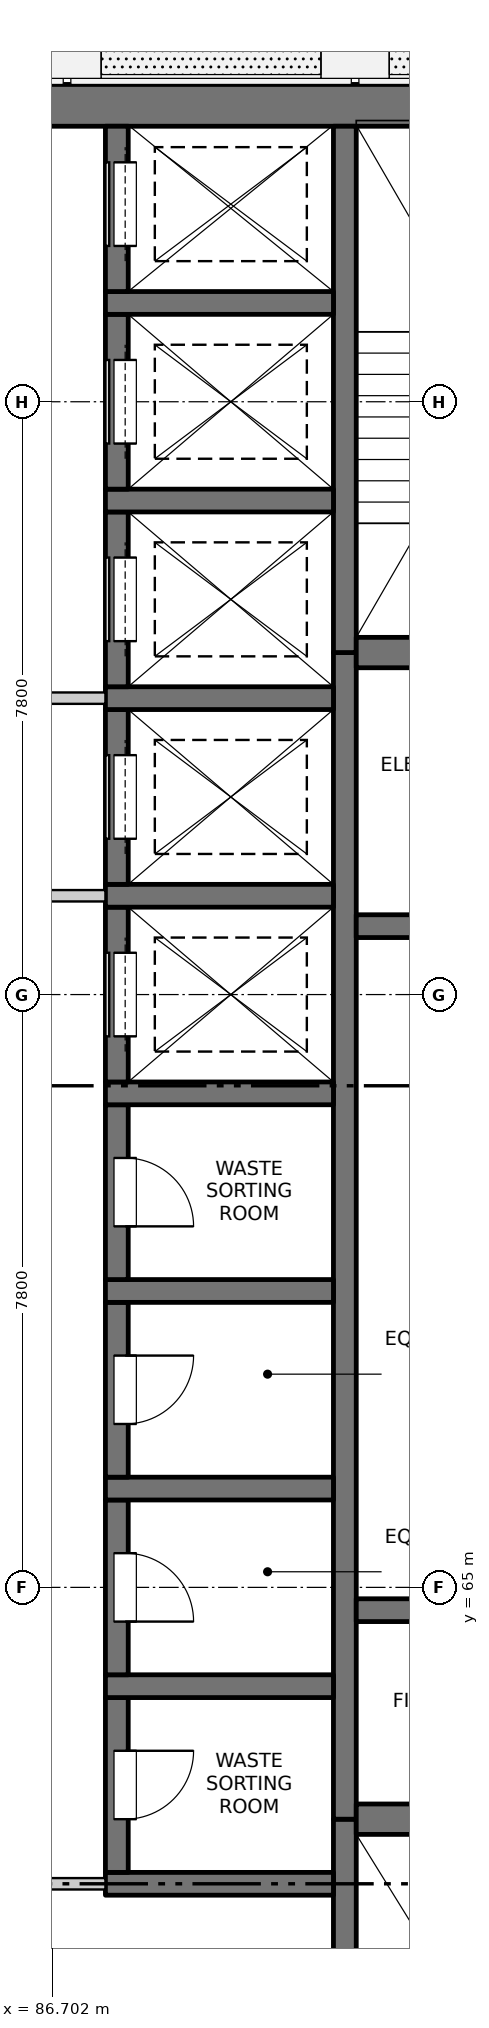
"""IFC4 building model, lengths in metres.
Left out: names, types, materials, properties, quantities, classifications, styles, units other than length and angle.
Written with IfcOpenShell. Run it as: python <this file> out.ifc"""

import sys

from ifc_helpers import new_model, si_unit, direction, frame, frame_2d, origin, place, context, subcontext, project, spatial, rectangle, extrude, element, fill, save


model = new_model("IFC4")
c1 = context("Model", 3, precision=1e-05, world=origin(), true_north=direction((0.0, 1.0)))
c2 = subcontext(c1, "Body", "Model", "MODEL_VIEW")
j1 = project(units=[si_unit("LENGTHUNIT", "METRE"), si_unit("PLANEANGLEUNIT", "RADIAN")], contexts=[c1])
p1 = place(None, origin())
s1 = spatial("IfcSite", under=j1, at=p1, CompositionType="ELEMENT")
p2 = place(p1, origin())
s2 = spatial("IfcBuilding", under=s1, at=p2, CompositionType="ELEMENT")
p3 = place(p2, frame((0.0, 0.0, 179.2)))
s3 = spatial("IfcBuildingStorey", under=s2, at=p3, CompositionType="ELEMENT", Elevation=179.2)
p4 = place(p3, frame((75.525, 84.5, -0.3), z_axis=(0.0, 0.0, 1.0), x_axis=(1.0, 0.0, 0.0)))
e1 = element("IfcWall", 1, at=p4, inside=s3, PredefinedType="SOLIDWALL", context=c2, shape_type="SweptSolid", body=[
    extrude(rectangle(XDim=18.95, YDim=0.55, at=frame_2d((9.475, 0.0))), origin(), (0.0, 0.0, 1.0), 3.45),
])
p5 = place(p3, frame((90.55, 55.525, -0.3), z_axis=(0.0, 0.0, 1.0), x_axis=(0.0, 1.0, 0.0)))
e2 = element("IfcWall", 2, at=p5, inside=s3, PredefinedType="SOLIDWALL", context=c2, shape_type="SweptSolid", body=[
    extrude(rectangle(XDim=6.425, YDim=0.3, at=frame_2d((3.212, 0.0))), origin(), (0.0, 0.0, 1.0), 3.45),
])
p6 = place(p5, frame((0.125, 0.0, 0.3)))
e3 = element("IfcOpeningElement", 3, at=p6, cuts=e2, PredefinedType="OPENING", context=c2, shape_type="SweptSolid", body=[
    extrude(rectangle(XDim=1.2, YDim=2.1, at=frame_2d((0.6, 1.05))), frame((0.0, 0.16, 0.0), z_axis=(0.0, -1.0, 0.0), x_axis=(1.0, 0.0, 0.0)), (0.0, 0.0, 1.0), 0.32),
])
p7 = place(p3, frame((90.55, 61.95, -0.3), z_axis=(0.0, 0.0, 1.0), x_axis=(0.0, 1.0, 0.0)))
e4 = element("IfcWall", 4, at=p7, inside=s3, PredefinedType="SOLIDWALL", context=c2, shape_type="SweptSolid", body=[
    extrude(rectangle(XDim=15.35, YDim=0.3, at=frame_2d((7.675, 0.0))), origin(), (0.0, 0.0, 1.0), 3.45),
])
p8 = place(p3, frame((90.55, 77.3, -0.3), z_axis=(0.0, 0.0, 1.0), x_axis=(0.0, 1.0, 0.0)))
e5 = element("IfcWall", 5, at=p8, inside=s3, PredefinedType="SOLIDWALL", context=c2, shape_type="SweptSolid", body=[
    extrude(rectangle(XDim=6.925, YDim=0.3, at=frame_2d((3.462, 0.0))), origin(), (0.0, 0.0, 1.0), 3.45),
])
p9 = place(p3, frame((87.4, 61.1, -0.3), z_axis=(0.0, 0.0, 1.0), x_axis=(1.0, 0.0, 0.0)))
e6 = element("IfcWall", 6, at=p9, inside=s3, PredefinedType="SOLIDWALL", context=c2, shape_type="SweptSolid", body=[
    extrude(rectangle(XDim=3.0, YDim=0.3, at=frame_2d((1.5, 0.0))), origin(), (0.0, 0.0, 1.0), 3.45),
])
p10 = place(p3, frame((87.55, 61.25, -0.3), z_axis=(0.0, 0.0, 1.0), x_axis=(0.0, 1.0, 0.0)))
e7 = element("IfcWall", 7, at=p10, inside=s3, PredefinedType="SOLIDWALL", context=c2, shape_type="SweptSolid", body=[
    extrude(rectangle(XDim=2.3, YDim=0.3, at=frame_2d((1.15, 0.0))), origin(), (0.0, 0.0, 1.0), 3.45),
])
p11 = place(p10, frame((0.7, 0.0, 0.3)))
e8 = element("IfcOpeningElement", 8, at=p11, cuts=e7, PredefinedType="OPENING", context=c2, shape_type="SweptSolid", body=[
    extrude(rectangle(XDim=0.9, YDim=2.1, at=frame_2d((0.45, 1.05))), frame((0.0, 0.16, 0.0), z_axis=(0.0, -1.0, 0.0), x_axis=(1.0, 0.0, 0.0)), (0.0, 0.0, 1.0), 0.32),
])
p12 = place(p3, frame((87.4, 63.7, -0.3), z_axis=(0.0, 0.0, 1.0), x_axis=(1.0, 0.0, 0.0)))
e9 = element("IfcWall", 9, at=p12, inside=s3, PredefinedType="SOLIDWALL", context=c2, shape_type="SweptSolid", body=[
    extrude(rectangle(XDim=3.0, YDim=0.3, at=frame_2d((1.5, 0.0))), origin(), (0.0, 0.0, 1.0), 3.45),
])
p13 = place(p3, frame((87.55, 63.85, -0.3), z_axis=(0.0, 0.0, 1.0), x_axis=(0.0, 1.0, 0.0)))
e10 = element("IfcWall", 10, at=p13, inside=s3, PredefinedType="SOLIDWALL", context=c2, shape_type="SweptSolid", body=[
    extrude(rectangle(XDim=2.3, YDim=0.3, at=frame_2d((1.15, 0.0))), origin(), (0.0, 0.0, 1.0), 3.45),
])
p14 = place(p13, frame((0.7, 0.0, 0.3)))
e11 = element("IfcOpeningElement", 11, at=p14, cuts=e10, PredefinedType="OPENING", context=c2, shape_type="SweptSolid", body=[
    extrude(rectangle(XDim=0.9, YDim=2.1, at=frame_2d((0.45, 1.05))), frame((0.0, 0.16, 0.0), z_axis=(0.0, -1.0, 0.0), x_axis=(1.0, 0.0, 0.0)), (0.0, 0.0, 1.0), 0.32),
])
p15 = place(p3, frame((87.4, 66.3, -0.3), z_axis=(0.0, 0.0, 1.0), x_axis=(1.0, 0.0, 0.0)))
e12 = element("IfcWall", 12, at=p15, inside=s3, PredefinedType="SOLIDWALL", context=c2, shape_type="SweptSolid", body=[
    extrude(rectangle(XDim=3.0, YDim=0.3, at=frame_2d((1.5, 0.0))), origin(), (0.0, 0.0, 1.0), 3.45),
])
p16 = place(p3, frame((87.55, 66.45, -0.3), z_axis=(0.0, 0.0, 1.0), x_axis=(0.0, 1.0, 0.0)))
e13 = element("IfcWall", 13, at=p16, inside=s3, PredefinedType="SOLIDWALL", context=c2, shape_type="SweptSolid", body=[
    extrude(rectangle(XDim=2.3, YDim=0.3, at=frame_2d((1.15, 0.0))), origin(), (0.0, 0.0, 1.0), 3.45),
])
p17 = place(p16, frame((0.7, 0.0, 0.3)))
e14 = element("IfcOpeningElement", 14, at=p17, cuts=e13, PredefinedType="OPENING", context=c2, shape_type="SweptSolid", body=[
    extrude(rectangle(XDim=0.9, YDim=2.1, at=frame_2d((0.45, 1.05))), frame((0.0, 0.16, 0.0), z_axis=(0.0, -1.0, 0.0), x_axis=(1.0, 0.0, 0.0)), (0.0, 0.0, 1.0), 0.32),
])
p18 = place(p3, frame((87.4, 68.9, -0.3), z_axis=(0.0, 0.0, 1.0), x_axis=(1.0, 0.0, 0.0)))
e15 = element("IfcWall", 15, at=p18, inside=s3, PredefinedType="SOLIDWALL", context=c2, shape_type="SweptSolid", body=[
    extrude(rectangle(XDim=3.0, YDim=0.3, at=frame_2d((1.5, 0.0))), origin(), (0.0, 0.0, 1.0), 3.45),
])
p19 = place(p3, frame((87.55, 69.05, -0.3), z_axis=(0.0, 0.0, 1.0), x_axis=(0.0, 1.0, 0.0)))
e16 = element("IfcWall", 16, at=p19, inside=s3, PredefinedType="SOLIDWALL", context=c2, shape_type="SweptSolid", body=[
    extrude(rectangle(XDim=2.3, YDim=0.3, at=frame_2d((1.15, 0.0))), origin(), (0.0, 0.0, 1.0), 3.45),
])
p20 = place(p19, frame((0.7, 0.0, 0.3)))
e17 = element("IfcOpeningElement", 17, at=p20, cuts=e16, PredefinedType="OPENING", context=c2, shape_type="SweptSolid", body=[
    extrude(rectangle(XDim=0.9, YDim=2.1, at=frame_2d((0.45, 1.05))), frame((0.0, 0.16, 0.0), z_axis=(0.0, -1.0, 0.0), x_axis=(1.0, 0.0, 0.0)), (0.0, 0.0, 1.0), 0.32),
])
p21 = place(p3, frame((87.4, 71.5, -0.3), z_axis=(0.0, 0.0, 1.0), x_axis=(1.0, 0.0, 0.0)))
e18 = element("IfcWall", 18, at=p21, inside=s3, PredefinedType="SOLIDWALL", context=c2, shape_type="SweptSolid", body=[
    extrude(rectangle(XDim=3.0, YDim=0.3, at=frame_2d((1.5, 0.0))), origin(), (0.0, 0.0, 1.0), 3.45),
])
p22 = place(p3, frame((87.55, 71.65, -0.3), z_axis=(0.0, 0.0, 1.0), x_axis=(0.0, 1.0, 0.0)))
e19 = element("IfcWall", 19, at=p22, inside=s3, PredefinedType="SOLIDWALL", context=c2, shape_type="SweptSolid", body=[
    extrude(rectangle(XDim=2.3, YDim=0.3, at=frame_2d((1.15, 0.0))), origin(), (0.0, 0.0, 1.0), 3.45),
])
p23 = place(p22, frame((0.6, 0.0, 0.3)))
e20 = element("IfcOpeningElement", 20, at=p23, cuts=e19, PredefinedType="OPENING", context=c2, shape_type="SweptSolid", body=[
    extrude(rectangle(XDim=1.1, YDim=2.1, at=frame_2d((0.55, 1.05))), frame((0.0, 0.16, 0.0), z_axis=(0.0, -1.0, 0.0), x_axis=(1.0, 0.0, 0.0)), (0.0, 0.0, 1.0), 0.32),
])
p24 = place(p3, frame((87.4, 74.1, -0.3), z_axis=(0.0, 0.0, 1.0), x_axis=(1.0, 0.0, 0.0)))
e21 = element("IfcWall", 21, at=p24, inside=s3, PredefinedType="SOLIDWALL", context=c2, shape_type="SweptSolid", body=[
    extrude(rectangle(XDim=3.0, YDim=0.3, at=frame_2d((1.5, 0.0))), origin(), (0.0, 0.0, 1.0), 3.45),
])
p25 = place(p3, frame((87.55, 74.25, -0.3), z_axis=(0.0, 0.0, 1.0), x_axis=(0.0, 1.0, 0.0)))
e22 = element("IfcWall", 22, at=p25, inside=s3, PredefinedType="SOLIDWALL", context=c2, shape_type="SweptSolid", body=[
    extrude(rectangle(XDim=2.3, YDim=0.3, at=frame_2d((1.15, 0.0))), origin(), (0.0, 0.0, 1.0), 3.45),
])
p26 = place(p25, frame((0.6, 0.0, 0.3)))
e23 = element("IfcOpeningElement", 23, at=p26, cuts=e22, PredefinedType="OPENING", context=c2, shape_type="SweptSolid", body=[
    extrude(rectangle(XDim=1.1, YDim=2.1, at=frame_2d((0.55, 1.05))), frame((0.0, 0.16, 0.0), z_axis=(0.0, -1.0, 0.0), x_axis=(1.0, 0.0, 0.0)), (0.0, 0.0, 1.0), 0.32),
])
p27 = place(p3, frame((87.4, 76.7, -0.3), z_axis=(0.0, 0.0, 1.0), x_axis=(1.0, 0.0, 0.0)))
e24 = element("IfcWall", 24, at=p27, inside=s3, PredefinedType="SOLIDWALL", context=c2, shape_type="SweptSolid", body=[
    extrude(rectangle(XDim=3.0, YDim=0.3, at=frame_2d((1.5, 0.0))), origin(), (0.0, 0.0, 1.0), 3.45),
])
p28 = place(p3, frame((87.55, 76.85, -0.3), z_axis=(0.0, 0.0, 1.0), x_axis=(0.0, 1.0, 0.0)))
e25 = element("IfcWall", 25, at=p28, inside=s3, PredefinedType="SOLIDWALL", context=c2, shape_type="SweptSolid", body=[
    extrude(rectangle(XDim=2.3, YDim=0.3, at=frame_2d((1.15, 0.0))), origin(), (0.0, 0.0, 1.0), 3.45),
])
p29 = place(p28, frame((0.6, 0.0, 0.3)))
e26 = element("IfcOpeningElement", 26, at=p29, cuts=e25, PredefinedType="OPENING", context=c2, shape_type="SweptSolid", body=[
    extrude(rectangle(XDim=1.1, YDim=2.1, at=frame_2d((0.55, 1.05))), frame((0.0, 0.16, 0.0), z_axis=(0.0, -1.0, 0.0), x_axis=(1.0, 0.0, 0.0)), (0.0, 0.0, 1.0), 0.32),
])
p30 = place(p3, frame((87.4, 79.3, -0.3), z_axis=(0.0, 0.0, 1.0), x_axis=(1.0, 0.0, 0.0)))
e27 = element("IfcWall", 27, at=p30, inside=s3, PredefinedType="SOLIDWALL", context=c2, shape_type="SweptSolid", body=[
    extrude(rectangle(XDim=3.0, YDim=0.3, at=frame_2d((1.5, 0.0))), origin(), (0.0, 0.0, 1.0), 3.45),
])
p31 = place(p3, frame((87.55, 79.45, -0.3), z_axis=(0.0, 0.0, 1.0), x_axis=(0.0, 1.0, 0.0)))
e28 = element("IfcWall", 28, at=p31, inside=s3, PredefinedType="SOLIDWALL", context=c2, shape_type="SweptSolid", body=[
    extrude(rectangle(XDim=2.3, YDim=0.3, at=frame_2d((1.15, 0.0))), origin(), (0.0, 0.0, 1.0), 3.45),
])
p32 = place(p31, frame((0.6, 0.0, 0.3)))
e29 = element("IfcOpeningElement", 29, at=p32, cuts=e28, PredefinedType="OPENING", context=c2, shape_type="SweptSolid", body=[
    extrude(rectangle(XDim=1.1, YDim=2.1, at=frame_2d((0.55, 1.05))), frame((0.0, 0.16, 0.0), z_axis=(0.0, -1.0, 0.0), x_axis=(1.0, 0.0, 0.0)), (0.0, 0.0, 1.0), 0.32),
])
p33 = place(p3, frame((87.4, 81.9, -0.3), z_axis=(0.0, 0.0, 1.0), x_axis=(1.0, 0.0, 0.0)))
e30 = element("IfcWall", 30, at=p33, inside=s3, PredefinedType="SOLIDWALL", context=c2, shape_type="SweptSolid", body=[
    extrude(rectangle(XDim=3.0, YDim=0.3, at=frame_2d((1.5, 0.0))), origin(), (0.0, 0.0, 1.0), 3.45),
])
p34 = place(p3, frame((87.55, 82.05, -0.3), z_axis=(0.0, 0.0, 1.0), x_axis=(0.0, 1.0, 0.0)))
e31 = element("IfcWall", 31, at=p34, inside=s3, PredefinedType="SOLIDWALL", context=c2, shape_type="SweptSolid", body=[
    extrude(rectangle(XDim=2.175, YDim=0.3, at=frame_2d((1.087, 0.0))), origin(), (0.0, 0.0, 1.0), 3.45),
])
p35 = place(p34, frame((0.6, 0.0, 0.3)))
e32 = element("IfcOpeningElement", 32, at=p35, cuts=e31, PredefinedType="OPENING", context=c2, shape_type="SweptSolid", body=[
    extrude(rectangle(XDim=1.1, YDim=2.1, at=frame_2d((0.55, 1.05))), frame((0.0, 0.16, 0.0), z_axis=(0.0, -1.0, 0.0), x_axis=(1.0, 0.0, 0.0)), (0.0, 0.0, 1.0), 0.32),
])
p36 = place(p3, frame((90.7, 61.95, -0.3), z_axis=(0.0, 0.0, 1.0), x_axis=(1.0, 0.0, 0.0)))
e33 = element("IfcWall", 33, at=p36, inside=s3, PredefinedType="SOLIDWALL", context=c2, shape_type="SweptSolid", body=[
    extrude(rectangle(XDim=3.775, YDim=0.4, at=frame_2d((1.888, 0.0))), origin(), (0.0, 0.0, 1.0), 3.45),
])
for number, where, z_axis, x_axis in (
    (34, (90.7, 64.7, -0.3), (0.0, 0.0, 1.0), (1.0, 0.0, 0.0)),
    (35, (90.7, 73.7, -0.3), (0.0, 0.0, 1.0), (1.0, 0.0, 0.0)),
):
    element("IfcWall", number, at=place(p3, frame(where, z_axis=z_axis, x_axis=x_axis)), inside=s3, PredefinedType="SOLIDWALL", context=c2, shape_type="SweptSolid", body=[
        extrude(rectangle(XDim=3.775, YDim=0.3, at=frame_2d((1.888, 0.0))), origin(), (0.0, 0.0, 1.0), 3.45),
    ])
p37 = place(p3, frame((90.7, 77.3, -0.3), z_axis=(0.0, 0.0, 1.0), x_axis=(1.0, 0.0, 0.0)))
e36 = element("IfcWall", 36, at=p37, inside=s3, PredefinedType="SOLIDWALL", context=c2, shape_type="SweptSolid", body=[
    extrude(rectangle(XDim=3.775, YDim=0.4, at=frame_2d((1.888, 0.0))), origin(), (0.0, 0.0, 1.0), 3.45),
])
p38 = place(p3, frame((82.6, 61.1, 0.0), z_axis=(0.0, 0.0, 1.0), x_axis=(1.0, 0.0, 0.0)))
e37 = element("IfcWall", 37, at=p38, inside=s3, PredefinedType="PARTITIONING", context=c2, shape_type="SweptSolid", body=[
    extrude(rectangle(XDim=4.8, YDim=0.15, at=frame_2d((2.4, 0.0))), origin(), (0.0, 0.0, 1.0), 3.15),
])
p39 = place(p38, frame((1.5, 0.0, 0.0)))
e38 = element("IfcOpeningElement", 38, at=p39, cuts=e37, PredefinedType="OPENING", context=c2, shape_type="SweptSolid", body=[
    extrude(rectangle(XDim=1.8, YDim=2.1, at=frame_2d((0.9, 1.05))), frame((0.0, 0.085, 0.0), z_axis=(0.0, -1.0, 0.0), x_axis=(1.0, 0.0, 0.0)), (0.0, 0.0, 1.0), 0.17),
])
p40 = place(p3, frame((82.6, 74.1, 0.0), z_axis=(0.0, 0.0, 1.0), x_axis=(1.0, 0.0, 0.0)))
e39 = element("IfcWall", 39, at=p40, inside=s3, PredefinedType="PARTITIONING", context=c2, shape_type="SweptSolid", body=[
    extrude(rectangle(XDim=4.8, YDim=0.15, at=frame_2d((2.4, 0.0))), origin(), (0.0, 0.0, 1.0), 3.15),
])
p41 = place(p40, frame((1.5, 0.0, 0.0)))
e40 = element("IfcOpeningElement", 40, at=p41, cuts=e39, PredefinedType="OPENING", context=c2, shape_type="SweptSolid", body=[
    extrude(rectangle(XDim=1.8, YDim=2.1, at=frame_2d((0.9, 1.05))), frame((0.0, 0.085, 0.0), z_axis=(0.0, -1.0, 0.0), x_axis=(1.0, 0.0, 0.0)), (0.0, 0.0, 1.0), 0.17),
])
p42 = place(p3, frame((82.6, 76.7, 0.0), z_axis=(0.0, 0.0, 1.0), x_axis=(1.0, 0.0, 0.0)))
e41 = element("IfcWall", 41, at=p42, inside=s3, PredefinedType="PARTITIONING", context=c2, shape_type="SweptSolid", body=[
    extrude(rectangle(XDim=4.8, YDim=0.15, at=frame_2d((2.4, 0.0))), origin(), (0.0, 0.0, 1.0), 3.15),
])
p43 = place(p42, frame((1.5, 0.0, 0.0)))
e42 = element("IfcOpeningElement", 42, at=p43, cuts=e41, PredefinedType="OPENING", context=c2, shape_type="SweptSolid", body=[
    extrude(rectangle(XDim=1.8, YDim=2.1, at=frame_2d((0.9, 1.05))), frame((0.0, 0.085, 0.0), z_axis=(0.0, -1.0, 0.0), x_axis=(1.0, 0.0, 0.0)), (0.0, 0.0, 1.0), 0.17),
])
p44 = place(p11, origin())
e43 = element("IfcDoor", 43, at=p44, inside=s3, OperationType="SINGLE_SWING_LEFT", PredefinedType="DOOR", context=c2, shape_type="SweptSolid", body=[
    extrude(rectangle(XDim=0.9, YDim=2.1, at=frame_2d((0.45, 1.05))), frame((0.0, -0.085, 0.0), z_axis=(0.0, -1.0, 0.0), x_axis=(1.0, 0.0, 0.0)), (0.0, 0.0, 1.0), 0.05),
])
fill(e8, e43)
p45 = place(p14, origin())
e44 = element("IfcDoor", 44, at=p45, inside=s3, OperationType="SINGLE_SWING_RIGHT", PredefinedType="DOOR", context=c2, shape_type="SweptSolid", body=[
    extrude(rectangle(XDim=0.9, YDim=2.1, at=frame_2d((0.45, 1.05))), frame((0.0, -0.085, 0.0), z_axis=(0.0, -1.0, 0.0), x_axis=(1.0, 0.0, 0.0)), (0.0, 0.0, 1.0), 0.05),
])
fill(e11, e44)
p46 = place(p17, origin())
e45 = element("IfcDoor", 45, at=p46, inside=s3, OperationType="SINGLE_SWING_LEFT", PredefinedType="DOOR", context=c2, shape_type="SweptSolid", body=[
    extrude(rectangle(XDim=0.9, YDim=2.1, at=frame_2d((0.45, 1.05))), frame((0.0, -0.085, 0.0), z_axis=(0.0, -1.0, 0.0), x_axis=(1.0, 0.0, 0.0)), (0.0, 0.0, 1.0), 0.05),
])
fill(e14, e45)
p47 = place(p20, origin())
e46 = element("IfcDoor", 46, at=p47, inside=s3, OperationType="SINGLE_SWING_RIGHT", PredefinedType="DOOR", context=c2, shape_type="SweptSolid", body=[
    extrude(rectangle(XDim=0.9, YDim=2.1, at=frame_2d((0.45, 1.05))), frame((0.0, -0.085, 0.0), z_axis=(0.0, -1.0, 0.0), x_axis=(1.0, 0.0, 0.0)), (0.0, 0.0, 1.0), 0.05),
])
fill(e17, e46)
p48 = place(p23, origin())
e47 = element("IfcDoor", 47, at=p48, inside=s3, OperationType="SLIDING_TO_LEFT", PredefinedType="DOOR", context=c2, shape_type="SweptSolid", body=[
    extrude(rectangle(XDim=1.1, YDim=2.1, at=frame_2d((0.55, 1.05))), frame((0.0, -0.085, 0.0), z_axis=(0.0, -1.0, 0.0), x_axis=(1.0, 0.0, 0.0)), (0.0, 0.0, 1.0), 0.05),
])
fill(e20, e47)
p49 = place(p26, origin())
e48 = element("IfcDoor", 48, at=p49, inside=s3, OperationType="SLIDING_TO_LEFT", PredefinedType="DOOR", context=c2, shape_type="SweptSolid", body=[
    extrude(rectangle(XDim=1.1, YDim=2.1, at=frame_2d((0.55, 1.05))), frame((0.0, -0.085, 0.0), z_axis=(0.0, -1.0, 0.0), x_axis=(1.0, 0.0, 0.0)), (0.0, 0.0, 1.0), 0.05),
])
fill(e23, e48)
p50 = place(p29, origin())
e49 = element("IfcDoor", 49, at=p50, inside=s3, OperationType="SLIDING_TO_LEFT", PredefinedType="DOOR", context=c2, shape_type="SweptSolid", body=[
    extrude(rectangle(XDim=1.1, YDim=2.1, at=frame_2d((0.55, 1.05))), frame((0.0, -0.085, 0.0), z_axis=(0.0, -1.0, 0.0), x_axis=(1.0, 0.0, 0.0)), (0.0, 0.0, 1.0), 0.05),
])
fill(e26, e49)
p51 = place(p32, origin())
e50 = element("IfcDoor", 50, at=p51, inside=s3, OperationType="SLIDING_TO_RIGHT", PredefinedType="DOOR", context=c2, shape_type="SweptSolid", body=[
    extrude(rectangle(XDim=1.1, YDim=2.1, at=frame_2d((0.55, 1.05))), frame((0.0, -0.085, 0.0), z_axis=(0.0, -1.0, 0.0), x_axis=(1.0, 0.0, 0.0)), (0.0, 0.0, 1.0), 0.05),
])
fill(e29, e50)
p52 = place(p35, origin())
e51 = element("IfcDoor", 51, at=p52, inside=s3, OperationType="SLIDING_TO_RIGHT", PredefinedType="DOOR", context=c2, shape_type="SweptSolid", body=[
    extrude(rectangle(XDim=1.1, YDim=2.1, at=frame_2d((0.55, 1.05))), frame((0.0, -0.085, 0.0), z_axis=(0.0, -1.0, 0.0), x_axis=(1.0, 0.0, 0.0)), (0.0, 0.0, 1.0), 0.05),
])
fill(e32, e51)
save(model, sys.argv[1])
